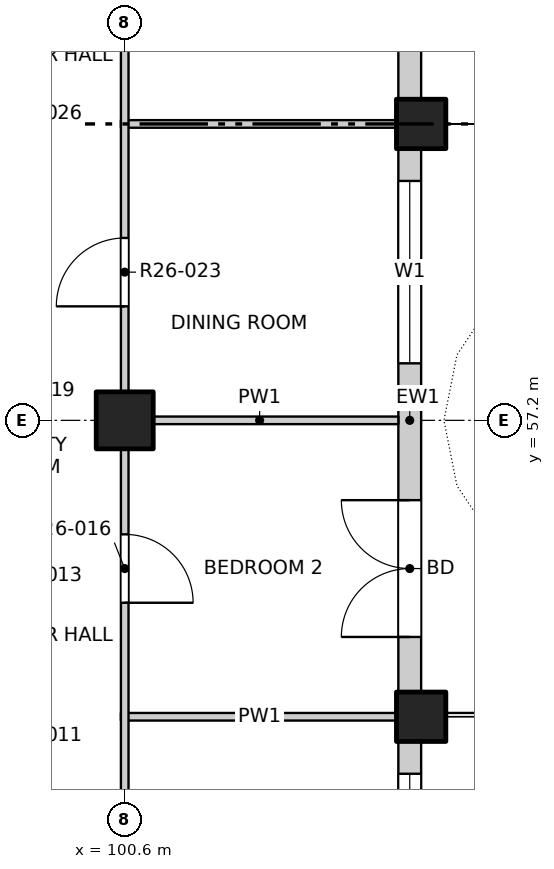
"""IFC4 building model, lengths in metres.
Left out: names, types, materials, properties, quantities, classifications, styles, units other than length and angle.
Written with IfcOpenShell. Run it as: python <this file> out.ifc"""

import sys

from ifc_helpers import new_model, si_unit, direction, frame, frame_2d, origin, origin_2d, place, context, subcontext, project, spatial, rectangle, extrude, element, fill, save


model = new_model("IFC4")
c1 = context("Model", 3, precision=1e-05, world=origin(), true_north=direction((0.0, 1.0)))
c2 = subcontext(c1, "Body", "Model", "MODEL_VIEW")
j1 = project(units=[si_unit("LENGTHUNIT", "METRE"), si_unit("PLANEANGLEUNIT", "RADIAN")], contexts=[c1])
p1 = place(None, origin())
s1 = spatial("IfcSite", under=j1, at=p1, CompositionType="ELEMENT")
p2 = place(p1, origin())
s2 = spatial("IfcBuilding", under=s1, at=p2, CompositionType="ELEMENT")
p3 = place(p2, frame((0.0, 0.0, 259.6)))
s3 = spatial("IfcBuildingStorey", under=s2, at=p3, CompositionType="ELEMENT", Elevation=259.6)
for number, where, z_axis, x_axis in (
    (1, (104.5, 53.3, -0.25), (0.0, 0.0, 1.0), (1.0, 0.0, 0.0)),
    (2, (104.5, 61.1, -0.25), (0.0, 0.0, 1.0), (1.0, 0.0, 0.0)),
):
    element("IfcColumn", number, at=place(p3, frame(where, z_axis=z_axis, x_axis=x_axis)), inside=s3, PredefinedType="COLUMN", context=c2, shape_type="SweptSolid", body=[
        extrude(rectangle(XDim=0.65, YDim=0.65, at=origin_2d()), origin(), (0.0, 0.0, 1.0), 3.4),
    ])
p4 = place(p3, frame((100.6, 57.2, -0.25), z_axis=(0.0, 0.0, 1.0), x_axis=(1.0, 0.0, 0.0)))
e3 = element("IfcColumn", 3, at=p4, inside=s3, PredefinedType="COLUMN", context=c2, shape_type="SweptSolid", body=[
    extrude(rectangle(XDim=0.75, YDim=0.75, at=origin_2d()), origin(), (0.0, 0.0, 1.0), 3.4),
])
p5 = place(p3, frame((104.35, 49.4, 0.0), z_axis=(0.0, 0.0, 1.0), x_axis=(0.0, 1.0, 0.0)))
e4 = element("IfcWall", 4, at=p5, inside=s3, PredefinedType="SOLIDWALL", context=c2, shape_type="SweptSolid", body=[
    extrude(rectangle(XDim=3.575, YDim=0.3, at=frame_2d((1.788, 0.0))), origin(), (0.0, 0.0, 1.0), 3.15),
])
p6 = place(p5, frame((0.75, 0.0, 0.9)))
e5 = element("IfcOpeningElement", 5, at=p6, cuts=e4, PredefinedType="OPENING", context=c2, shape_type="SweptSolid", body=[
    extrude(rectangle(XDim=2.4, YDim=1.8, at=frame_2d((1.2, 0.9))), frame((0.0, 0.16, 0.0), z_axis=(0.0, -1.0, 0.0), x_axis=(1.0, 0.0, 0.0)), (0.0, 0.0, 1.0), 0.32),
])
p7 = place(p3, frame((104.35, 53.625, 0.0), z_axis=(0.0, 0.0, 1.0), x_axis=(0.0, 1.0, 0.0)))
e6 = element("IfcWall", 6, at=p7, inside=s3, PredefinedType="SOLIDWALL", context=c2, shape_type="SweptSolid", body=[
    extrude(rectangle(XDim=7.15, YDim=0.3, at=frame_2d((3.575, 0.0))), origin(), (0.0, 0.0, 1.0), 3.15),
])
p8 = place(p7, frame((0.725, 0.0, 0.0)))
e7 = element("IfcOpeningElement", 7, at=p8, cuts=e6, PredefinedType="OPENING", context=c2, shape_type="SweptSolid", body=[
    extrude(rectangle(XDim=1.8, YDim=2.4, at=frame_2d((0.9, 1.2))), frame((0.0, 0.16, 0.0), z_axis=(0.0, -1.0, 0.0), x_axis=(1.0, 0.0, 0.0)), (0.0, 0.0, 1.0), 0.32),
])
p9 = place(p7, frame((4.325, 0.0, 0.9)))
e8 = element("IfcOpeningElement", 8, at=p9, cuts=e6, PredefinedType="OPENING", context=c2, shape_type="SweptSolid", body=[
    extrude(rectangle(XDim=2.4, YDim=1.8, at=frame_2d((1.2, 0.9))), frame((0.0, 0.16, 0.0), z_axis=(0.0, -1.0, 0.0), x_axis=(1.0, 0.0, 0.0)), (0.0, 0.0, 1.0), 0.32),
])
p10 = place(p3, frame((104.35, 61.425, 0.0), z_axis=(0.0, 0.0, 1.0), x_axis=(0.0, 1.0, 0.0)))
e9 = element("IfcWall", 9, at=p10, inside=s3, PredefinedType="SOLIDWALL", context=c2, shape_type="SweptSolid", body=[
    extrude(rectangle(XDim=7.15, YDim=0.3, at=frame_2d((3.575, 0.0))), origin(), (0.0, 0.0, 1.0), 3.15),
])
p11 = place(p10, frame((0.725, 0.0, 0.0)))
e10 = element("IfcOpeningElement", 10, at=p11, cuts=e9, PredefinedType="OPENING", context=c2, shape_type="SweptSolid", body=[
    extrude(rectangle(XDim=1.8, YDim=2.4, at=frame_2d((0.9, 1.2))), frame((0.0, 0.16, 0.0), z_axis=(0.0, -1.0, 0.0), x_axis=(1.0, 0.0, 0.0)), (0.0, 0.0, 1.0), 0.32),
])
p12 = place(p10, frame((4.325, 0.0, 0.9)))
e11 = element("IfcOpeningElement", 11, at=p12, cuts=e9, PredefinedType="OPENING", context=c2, shape_type="SweptSolid", body=[
    extrude(rectangle(XDim=2.4, YDim=1.8, at=frame_2d((1.2, 0.9))), frame((0.0, 0.16, 0.0), z_axis=(0.0, -1.0, 0.0), x_axis=(1.0, 0.0, 0.0)), (0.0, 0.0, 1.0), 0.32),
])
for number, where, z_axis, x_axis in (
    (12, (100.55, 53.3, 0.0), (0.0, 0.0, 1.0), (1.0, 0.0, 0.0)),
    (13, (100.55, 57.2, 0.0), (0.0, 0.0, 1.0), (1.0, 0.0, 0.0)),
    (14, (100.55, 61.1, 0.0), (0.0, 0.0, 1.0), (1.0, 0.0, 0.0)),
):
    element("IfcWall", number, at=place(p3, frame(where, z_axis=z_axis, x_axis=x_axis)), inside=s3, PredefinedType="PARTITIONING", context=c2, shape_type="SweptSolid", body=[
        extrude(rectangle(XDim=3.65, YDim=0.1, at=frame_2d((1.825, 0.0))), origin(), (0.0, 0.0, 1.0), 3.15),
    ])
p13 = place(p3, frame((100.6, 45.8, 0.0), z_axis=(0.0, 0.0, 1.0), x_axis=(0.0, 1.0, 0.0)))
e15 = element("IfcWall", 15, at=p13, inside=s3, PredefinedType="PARTITIONING", context=c2, shape_type="SweptSolid", body=[
    extrude(rectangle(XDim=38.4, YDim=0.1, at=frame_2d((19.2, 0.0))), origin(), (0.0, 0.0, 1.0), 3.15),
])
p14 = place(p13, frame((1.05, 0.0, 0.0)))
e16 = element("IfcOpeningElement", 16, at=p14, cuts=e15, PredefinedType="OPENING", context=c2, shape_type="SweptSolid", body=[
    extrude(rectangle(XDim=1.2, YDim=2.1, at=frame_2d((0.6, 1.05))), frame((0.0, 0.06, 0.0), z_axis=(0.0, -1.0, 0.0), x_axis=(1.0, 0.0, 0.0)), (0.0, 0.0, 1.0), 0.12),
])
p15 = place(p13, frame((5.1, 0.0, 0.0)))
e17 = element("IfcOpeningElement", 17, at=p15, cuts=e15, PredefinedType="OPENING", context=c2, shape_type="SweptSolid", body=[
    extrude(rectangle(XDim=0.9, YDim=2.1, at=frame_2d((0.45, 1.05))), frame((0.0, 0.06, 0.0), z_axis=(0.0, -1.0, 0.0), x_axis=(1.0, 0.0, 0.0)), (0.0, 0.0, 1.0), 0.12),
])
p16 = place(p13, frame((9.0, 0.0, 0.0)))
e18 = element("IfcOpeningElement", 18, at=p16, cuts=e15, PredefinedType="OPENING", context=c2, shape_type="SweptSolid", body=[
    extrude(rectangle(XDim=0.9, YDim=2.1, at=frame_2d((0.45, 1.05))), frame((0.0, 0.06, 0.0), z_axis=(0.0, -1.0, 0.0), x_axis=(1.0, 0.0, 0.0)), (0.0, 0.0, 1.0), 0.12),
])
p17 = place(p13, frame((12.9, 0.0, 0.0)))
e19 = element("IfcOpeningElement", 19, at=p17, cuts=e15, PredefinedType="OPENING", context=c2, shape_type="SweptSolid", body=[
    extrude(rectangle(XDim=0.9, YDim=2.1, at=frame_2d((0.45, 1.05))), frame((0.0, 0.06, 0.0), z_axis=(0.0, -1.0, 0.0), x_axis=(1.0, 0.0, 0.0)), (0.0, 0.0, 1.0), 0.12),
])
p18 = place(p13, frame((16.8, 0.0, 0.0)))
e20 = element("IfcOpeningElement", 20, at=p18, cuts=e15, PredefinedType="OPENING", context=c2, shape_type="SweptSolid", body=[
    extrude(rectangle(XDim=0.9, YDim=2.1, at=frame_2d((0.45, 1.05))), frame((0.0, 0.06, 0.0), z_axis=(0.0, -1.0, 0.0), x_axis=(1.0, 0.0, 0.0)), (0.0, 0.0, 1.0), 0.12),
])
p19 = place(p13, frame((20.7, 0.0, 0.0)))
e21 = element("IfcOpeningElement", 21, at=p19, cuts=e15, PredefinedType="OPENING", context=c2, shape_type="SweptSolid", body=[
    extrude(rectangle(XDim=0.9, YDim=2.1, at=frame_2d((0.45, 1.05))), frame((0.0, 0.06, 0.0), z_axis=(0.0, -1.0, 0.0), x_axis=(1.0, 0.0, 0.0)), (0.0, 0.0, 1.0), 0.12),
])
p20 = place(p13, frame((24.6, 0.0, 0.0)))
e22 = element("IfcOpeningElement", 22, at=p20, cuts=e15, PredefinedType="OPENING", context=c2, shape_type="SweptSolid", body=[
    extrude(rectangle(XDim=0.9, YDim=2.1, at=frame_2d((0.45, 1.05))), frame((0.0, 0.06, 0.0), z_axis=(0.0, -1.0, 0.0), x_axis=(1.0, 0.0, 0.0)), (0.0, 0.0, 1.0), 0.12),
])
p21 = place(p13, frame((28.5, 0.0, 0.0)))
e23 = element("IfcOpeningElement", 23, at=p21, cuts=e15, PredefinedType="OPENING", context=c2, shape_type="SweptSolid", body=[
    extrude(rectangle(XDim=0.9, YDim=2.1, at=frame_2d((0.45, 1.05))), frame((0.0, 0.06, 0.0), z_axis=(0.0, -1.0, 0.0), x_axis=(1.0, 0.0, 0.0)), (0.0, 0.0, 1.0), 0.12),
])
p22 = place(p13, frame((32.4, 0.0, 0.0)))
e24 = element("IfcOpeningElement", 24, at=p22, cuts=e15, PredefinedType="OPENING", context=c2, shape_type="SweptSolid", body=[
    extrude(rectangle(XDim=0.9, YDim=2.1, at=frame_2d((0.45, 1.05))), frame((0.0, 0.06, 0.0), z_axis=(0.0, -1.0, 0.0), x_axis=(1.0, 0.0, 0.0)), (0.0, 0.0, 1.0), 0.12),
])
p23 = place(p13, frame((36.15, 0.0, 0.0)))
e25 = element("IfcOpeningElement", 25, at=p23, cuts=e15, PredefinedType="OPENING", context=c2, shape_type="SweptSolid", body=[
    extrude(rectangle(XDim=1.2, YDim=2.1, at=frame_2d((0.6, 1.05))), frame((0.0, 0.06, 0.0), z_axis=(0.0, -1.0, 0.0), x_axis=(1.0, 0.0, 0.0)), (0.0, 0.0, 1.0), 0.12),
])
p24 = place(p6, origin())
e26 = element("IfcWindow", 26, at=p24, inside=s3, PartitioningType="DOUBLE_PANEL_VERTICAL", PredefinedType="WINDOW", context=c2, shape_type="SweptSolid", body=[
    extrude(rectangle(XDim=2.4, YDim=1.8, at=frame_2d((1.2, 0.9))), frame((0.0, 0.03, 0.0), z_axis=(0.0, -1.0, 0.0), x_axis=(1.0, 0.0, 0.0)), (0.0, 0.0, 1.0), 0.06),
])
fill(e5, e26)
p25 = place(p8, origin())
e27 = element("IfcDoor", 27, at=p25, inside=s3, OperationType="DOUBLE_DOOR_SINGLE_SWING", PredefinedType="DOOR", context=c2, shape_type="SweptSolid", body=[
    extrude(rectangle(XDim=1.8, YDim=2.4, at=frame_2d((0.9, 1.2))), frame((0.0, 0.025, 0.0), z_axis=(0.0, -1.0, 0.0), x_axis=(1.0, 0.0, 0.0)), (0.0, 0.0, 1.0), 0.05),
])
fill(e7, e27)
p26 = place(p9, origin())
e28 = element("IfcWindow", 28, at=p26, inside=s3, PartitioningType="DOUBLE_PANEL_VERTICAL", PredefinedType="WINDOW", context=c2, shape_type="SweptSolid", body=[
    extrude(rectangle(XDim=2.4, YDim=1.8, at=frame_2d((1.2, 0.9))), frame((0.0, 0.03, 0.0), z_axis=(0.0, -1.0, 0.0), x_axis=(1.0, 0.0, 0.0)), (0.0, 0.0, 1.0), 0.06),
])
fill(e8, e28)
p27 = place(p16, origin())
e29 = element("IfcDoor", 29, at=p27, inside=s3, OperationType="SINGLE_SWING_RIGHT", PredefinedType="DOOR", context=c2, shape_type="SweptSolid", body=[
    extrude(rectangle(XDim=0.9, YDim=2.1, at=frame_2d((0.45, 1.05))), frame((0.0, 0.025, 0.0), z_axis=(0.0, -1.0, 0.0), x_axis=(1.0, 0.0, 0.0)), (0.0, 0.0, 1.0), 0.05),
])
fill(e18, e29)
p28 = place(p17, origin())
e30 = element("IfcDoor", 30, at=p28, inside=s3, OperationType="SINGLE_SWING_LEFT", PredefinedType="DOOR", context=c2, shape_type="SweptSolid", body=[
    extrude(rectangle(XDim=0.9, YDim=2.1, at=frame_2d((0.45, 1.05))), frame((0.0, 0.025, 0.0), z_axis=(0.0, -1.0, 0.0), x_axis=(1.0, 0.0, 0.0)), (0.0, 0.0, 1.0), 0.05),
])
fill(e19, e30)
save(model, sys.argv[1])
